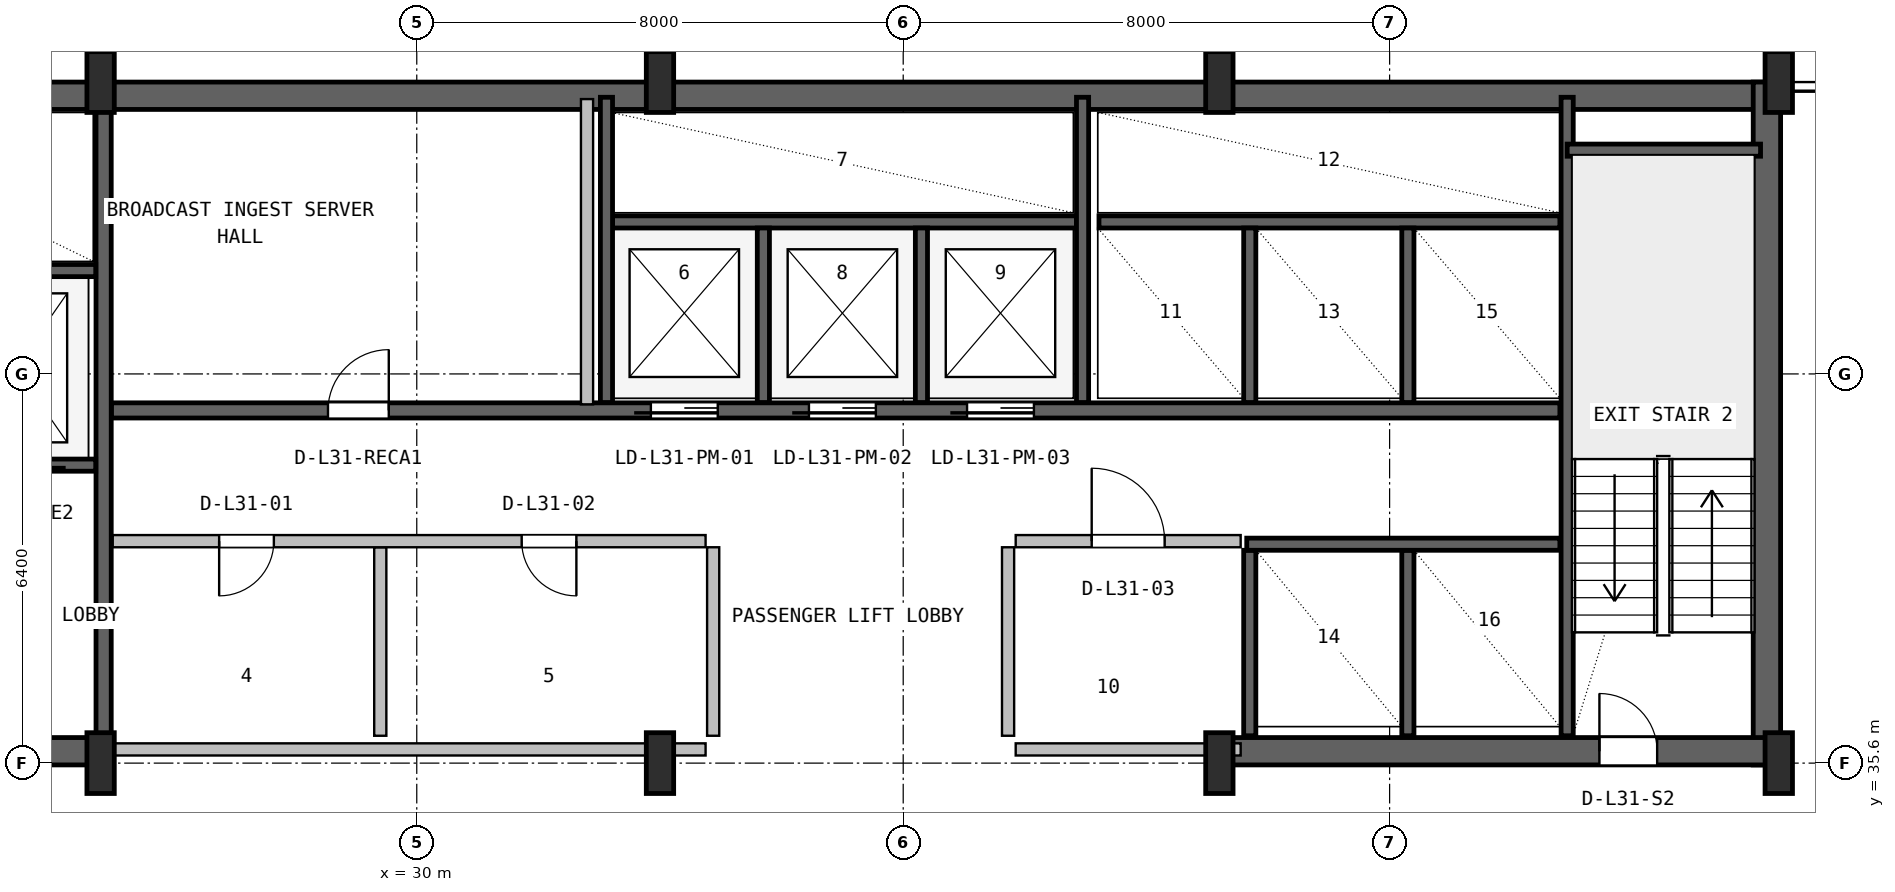
"""IFC4 building model, lengths in metres.
Left out: names, types, materials, properties, quantities, classifications, styles, units other than length and angle.
Written with IfcOpenShell. Run it as: python <this file> out.ifc"""

import sys

from ifc_helpers import new_model, si_unit, direction, frame, frame_2d, origin, origin_2d, place, context, subcontext, project, spatial, rectangle, i_section, extrude, source, transform, mapped, element, fill, save


model = new_model("IFC4")
c1 = context("Model", 3, precision=1e-05, world=origin(), true_north=direction((0.0, 1.0)))
c2 = subcontext(c1, "Body", "Model", "MODEL_VIEW")
j1 = project(units=[si_unit("LENGTHUNIT", "METRE"), si_unit("PLANEANGLEUNIT", "RADIAN")], contexts=[c1])
p1 = place(None, origin())
s1 = spatial("IfcSite", under=j1, at=p1, CompositionType="ELEMENT")
p2 = place(p1, origin())
s2 = spatial("IfcBuilding", under=s1, at=p2, CompositionType="ELEMENT")
p3 = place(p2, frame((0.0, 0.0, 129.6)))
s3 = spatial("IfcBuildingStorey", under=s2, at=p3, CompositionType="ELEMENT", Elevation=129.6)
p4 = place(p3, frame((15.6, 46.575, 0.0), z_axis=(0.0, 0.0, 1.0), x_axis=(1.0, 0.0, 0.0)))
e1 = element("IfcWall", 1, at=p4, inside=s3, PredefinedType="SHEAR", context=c2, shape_type="SweptSolid", body=[
    extrude(rectangle(XDim=36.8, YDim=0.45, at=frame_2d((18.4, 0.0))), origin(), (0.0, 0.0, 1.0), 3.55),
])
p5 = place(p3, frame((52.205, 35.57, 0.0), z_axis=(0.0, 0.0, 1.0), x_axis=(0.0, 1.0, 0.0)))
e2 = element("IfcWall", 2, at=p5, inside=s3, PredefinedType="SHEAR", context=c2, shape_type="SweptSolid", body=[
    extrude(rectangle(XDim=11.23, YDim=0.45, at=frame_2d((5.615, 0.0))), origin(), (0.0, 0.0, 1.0), 3.55),
])
p6 = place(p3, frame((15.57, 35.795, 0.0), z_axis=(0.0, 0.0, 1.0), x_axis=(1.0, 0.0, 0.0)))
e3 = element("IfcWall", 3, at=p6, inside=s3, PredefinedType="SHEAR", context=c2, shape_type="SweptSolid", body=[
    extrude(rectangle(XDim=9.23, YDim=0.45, at=frame_2d((4.615, 0.0))), origin(), (0.0, 0.0, 1.0), 3.55),
])
p7 = place(p6, frame((5.4, 0.0, 0.0)))
e4 = element("IfcOpeningElement", 4, at=p7, cuts=e3, PredefinedType="OPENING", context=c2, shape_type="SweptSolid", body=[
    extrude(rectangle(XDim=1.0, YDim=2.1, at=frame_2d((0.5, 1.05))), frame((0.0, 0.235, 0.0), z_axis=(0.0, -1.0, 0.0), x_axis=(1.0, 0.0, 0.0)), (0.0, 0.0, 1.0), 0.47),
])
p8 = place(p3, frame((43.2, 35.795, 0.0), z_axis=(0.0, 0.0, 1.0), x_axis=(1.0, 0.0, 0.0)))
e5 = element("IfcWall", 5, at=p8, inside=s3, PredefinedType="SHEAR", context=c2, shape_type="SweptSolid", body=[
    extrude(rectangle(XDim=9.23, YDim=0.45, at=frame_2d((4.615, 0.0))), origin(), (0.0, 0.0, 1.0), 3.55),
])
p9 = place(p8, frame((6.25, 0.0, 0.0)))
e6 = element("IfcOpeningElement", 6, at=p9, cuts=e5, PredefinedType="OPENING", context=c2, shape_type="SweptSolid", body=[
    extrude(rectangle(XDim=0.95, YDim=2.1, at=frame_2d((0.475, 1.05))), frame((0.0, 0.235, 0.0), z_axis=(0.0, -1.0, 0.0), x_axis=(1.0, 0.0, 0.0)), (0.0, 0.0, 1.0), 0.47),
])
m1 = source(origin(), c2, "Body", "SweptSolid", [
    extrude(i_section(OverallWidth=0.45, OverallDepth=1.0, WebThickness=0.016, FlangeThickness=0.03, FilletRadius=0.016, at=origin_2d()), origin(), (0.0, 0.0, 1.0), 3.8),
])
for number, where, z_axis, x_axis in (
    (7, (24.8, 35.6, 0.0), (0.0, 0.0, 1.0), (1.0, 0.0, 0.0)),
    (8, (24.8, 46.8, 0.0), (0.0, 0.0, 1.0), (1.0, 0.0, 0.0)),
    (9, (34.0, 35.6, 0.0), (0.0, 0.0, 1.0), (1.0, 0.0, 0.0)),
    (10, (34.0, 46.8, 0.0), (0.0, 0.0, 1.0), (1.0, 0.0, 0.0)),
    (11, (43.2, 35.6, 0.0), (0.0, 0.0, 1.0), (1.0, 0.0, 0.0)),
    (12, (43.2, 46.8, 0.0), (0.0, 0.0, 1.0), (1.0, 0.0, 0.0)),
    (13, (52.4, 35.6, 0.0), (0.0, 0.0, 1.0), (1.0, 0.0, 0.0)),
    (14, (52.4, 46.8, 0.0), (0.0, 0.0, 1.0), (1.0, 0.0, 0.0)),
):
    element("IfcColumn", number, at=place(p3, frame(where, z_axis=z_axis, x_axis=x_axis)), inside=s3, PredefinedType="COLUMN", context=c2, shape_type="MappedRepresentation", body=[
        mapped(m1, transform((0.0, 0.0, 0.0), x_axis=(1.0, 0.0, 0.0), y_axis=(0.0, 1.0, 0.0), z_axis=(0.0, 0.0, 1.0), scale=1.0)),
    ])
p10 = place(p3, frame((24.85, 36.05, 0.0), z_axis=(0.0, 0.0, 1.0), x_axis=(0.0, 1.0, 0.0)))
e15 = element("IfcWall", 15, at=p10, inside=s3, PredefinedType="SHEAR", context=c2, shape_type="SweptSolid", body=[
    extrude(rectangle(XDim=10.45, YDim=0.25, at=frame_2d((5.225, 0.0))), origin(), (0.0, 0.0, 1.0), 3.55),
])
p11 = place(p3, frame((19.2, 40.5, 0.0), z_axis=(0.0, 0.0, 1.0), x_axis=(1.0, 0.0, 0.0)))
e16 = element("IfcWall", 16, at=p11, inside=s3, PredefinedType="SHEAR", context=c2, shape_type="SweptSolid", body=[
    extrude(rectangle(XDim=5.52, YDim=0.2, at=frame_2d((2.76, 0.0))), origin(), (0.0, 0.0, 1.0), 3.55),
])
p12 = place(p11, frame((1.05, 0.0, 0.0)))
e17 = element("IfcOpeningElement", 17, at=p12, cuts=e16, PredefinedType="OPENING", context=c2, shape_type="SweptSolid", body=[
    extrude(rectangle(XDim=1.1, YDim=2.18, at=frame_2d((0.55, 1.09))), frame((0.0, 0.11, 0.0), z_axis=(0.0, -1.0, 0.0), x_axis=(1.0, 0.0, 0.0)), (0.0, 0.0, 1.0), 0.22),
])
p13 = place(p11, frame((3.65, 0.0, 0.0)))
e18 = element("IfcOpeningElement", 18, at=p13, cuts=e16, PredefinedType="OPENING", context=c2, shape_type="SweptSolid", body=[
    extrude(rectangle(XDim=1.1, YDim=2.18, at=frame_2d((0.55, 1.09))), frame((0.0, 0.11, 0.0), z_axis=(0.0, -1.0, 0.0), x_axis=(1.0, 0.0, 0.0)), (0.0, 0.0, 1.0), 0.22),
])
p14 = place(p3, frame((19.2, 43.7, 0.0), z_axis=(0.0, 0.0, 1.0), x_axis=(1.0, 0.0, 0.0)))
e19 = element("IfcWall", 19, at=p14, inside=s3, PredefinedType="SHEAR", context=c2, shape_type="SweptSolid", body=[
    extrude(rectangle(XDim=5.52, YDim=0.2, at=frame_2d((2.76, 0.0))), origin(), (0.0, 0.0, 1.0), 3.55),
])
p15 = place(p3, frame((48.92, 36.05, 0.0), z_axis=(0.0, 0.0, 1.0), x_axis=(0.0, 1.0, 0.0)))
e20 = element("IfcWall", 20, at=p15, inside=s3, PredefinedType="SHEAR", context=c2, shape_type="SweptSolid", body=[
    extrude(rectangle(XDim=10.5, YDim=0.2, at=frame_2d((5.25, 0.0))), origin(), (0.0, 0.0, 1.0), 3.55),
])
p16 = place(p3, frame((48.92, 45.68, 0.0), z_axis=(0.0, 0.0, 1.0), x_axis=(1.0, 0.0, 0.0)))
e21 = element("IfcWall", 21, at=p16, inside=s3, PredefinedType="SHEAR", context=c2, shape_type="SweptSolid", body=[
    extrude(rectangle(XDim=3.18, YDim=0.2, at=frame_2d((1.59, 0.0))), origin(), (0.0, 0.0, 1.0), 3.55),
])
p17 = place(p3, frame((24.98, 41.4, 0.0), z_axis=(0.0, 0.0, 1.0), x_axis=(1.0, 0.0, 0.0)))
e22 = element("IfcWall", 22, at=p17, inside=s3, PredefinedType="SHEAR", context=c2, shape_type="SweptSolid", body=[
    extrude(rectangle(XDim=23.82, YDim=0.25, at=frame_2d((11.91, 0.0))), origin(), (0.0, 0.0, 1.0), 3.55),
])
p18 = place(p17, frame((8.87, 0.0, 0.0)))
e23 = element("IfcOpeningElement", 23, at=p18, cuts=e22, PredefinedType="OPENING", context=c2, shape_type="SweptSolid", body=[
    extrude(rectangle(XDim=1.1, YDim=2.18, at=frame_2d((0.55, 1.09))), frame((0.0, 0.135, 0.0), z_axis=(0.0, -1.0, 0.0), x_axis=(1.0, 0.0, 0.0)), (0.0, 0.0, 1.0), 0.27),
])
p19 = place(p17, frame((11.47, 0.0, 0.0)))
e24 = element("IfcOpeningElement", 24, at=p19, cuts=e22, PredefinedType="OPENING", context=c2, shape_type="SweptSolid", body=[
    extrude(rectangle(XDim=1.1, YDim=2.18, at=frame_2d((0.55, 1.09))), frame((0.0, 0.135, 0.0), z_axis=(0.0, -1.0, 0.0), x_axis=(1.0, 0.0, 0.0)), (0.0, 0.0, 1.0), 0.27),
])
p20 = place(p17, frame((14.07, 0.0, 0.0)))
e25 = element("IfcOpeningElement", 25, at=p20, cuts=e22, PredefinedType="OPENING", context=c2, shape_type="SweptSolid", body=[
    extrude(rectangle(XDim=1.1, YDim=2.18, at=frame_2d((0.55, 1.09))), frame((0.0, 0.135, 0.0), z_axis=(0.0, -1.0, 0.0), x_axis=(1.0, 0.0, 0.0)), (0.0, 0.0, 1.0), 0.27),
])
p21 = place(p17, frame((3.56, 0.0, 0.0)))
e26 = element("IfcOpeningElement", 26, at=p21, cuts=e22, PredefinedType="OPENING", context=c2, shape_type="SweptSolid", body=[
    extrude(rectangle(XDim=1.0, YDim=2.08, at=frame_2d((0.5, 1.04))), frame((0.0, 0.135, 0.0), z_axis=(0.0, -1.0, 0.0), x_axis=(1.0, 0.0, 0.0)), (0.0, 0.0, 1.0), 0.27),
])
p22 = place(p3, frame((33.22, 44.5, 0.0), z_axis=(0.0, 0.0, 1.0), x_axis=(1.0, 0.0, 0.0)))
e27 = element("IfcWall", 27, at=p22, inside=s3, PredefinedType="SHEAR", context=c2, shape_type="SweptSolid", body=[
    extrude(rectangle(XDim=7.63, YDim=0.2, at=frame_2d((3.815, 0.0))), origin(), (0.0, 0.0, 1.0), 3.55),
])
p23 = place(p3, frame((33.12, 41.53, 0.0), z_axis=(0.0, 0.0, 1.0), x_axis=(0.0, 1.0, 0.0)))
e28 = element("IfcWall", 28, at=p23, inside=s3, PredefinedType="SHEAR", context=c2, shape_type="SweptSolid", body=[
    extrude(rectangle(XDim=5.02, YDim=0.2, at=frame_2d((2.51, 0.0))), origin(), (0.0, 0.0, 1.0), 3.55),
])
for number, where, z_axis, x_axis in (
    (29, (35.7, 41.53, 0.0), (0.0, 0.0, 1.0), (0.0, 1.0, 0.0)),
    (30, (38.3, 41.53, 0.0), (0.0, 0.0, 1.0), (0.0, 1.0, 0.0)),
):
    element("IfcWall", number, at=place(p3, frame(where, z_axis=z_axis, x_axis=x_axis)), inside=s3, PredefinedType="SHEAR", context=c2, shape_type="SweptSolid", body=[
        extrude(rectangle(XDim=2.87, YDim=0.2, at=frame_2d((1.435, 0.0))), origin(), (0.0, 0.0, 1.0), 3.55),
    ])
p24 = place(p3, frame((40.95, 41.53, 0.0), z_axis=(0.0, 0.0, 1.0), x_axis=(0.0, 1.0, 0.0)))
e31 = element("IfcWall", 31, at=p24, inside=s3, PredefinedType="SHEAR", context=c2, shape_type="SweptSolid", body=[
    extrude(rectangle(XDim=5.02, YDim=0.2, at=frame_2d((2.51, 0.0))), origin(), (0.0, 0.0, 1.0), 3.55),
])
p25 = place(p3, frame((41.22, 44.5, 0.0), z_axis=(0.0, 0.0, 1.0), x_axis=(1.0, 0.0, 0.0)))
e32 = element("IfcWall", 32, at=p25, inside=s3, PredefinedType="SHEAR", context=c2, shape_type="SweptSolid", body=[
    extrude(rectangle(XDim=7.58, YDim=0.2, at=frame_2d((3.79, 0.0))), origin(), (0.0, 0.0, 1.0), 3.55),
])
for number, where, z_axis, x_axis in (
    (33, (43.7, 41.53, 0.0), (0.0, 0.0, 1.0), (0.0, 1.0, 0.0)),
    (34, (46.3, 41.53, 0.0), (0.0, 0.0, 1.0), (0.0, 1.0, 0.0)),
):
    element("IfcWall", number, at=place(p3, frame(where, z_axis=z_axis, x_axis=x_axis)), inside=s3, PredefinedType="SHEAR", context=c2, shape_type="SweptSolid", body=[
        extrude(rectangle(XDim=2.87, YDim=0.2, at=frame_2d((1.435, 0.0))), origin(), (0.0, 0.0, 1.0), 3.55),
    ])
for number, where, z_axis, x_axis in (
    (35, (43.7, 36.05, 0.0), (0.0, 0.0, 1.0), (0.0, 1.0, 0.0)),
    (36, (46.3, 36.05, 0.0), (0.0, 0.0, 1.0), (0.0, 1.0, 0.0)),
):
    element("IfcWall", number, at=place(p3, frame(where, z_axis=z_axis, x_axis=x_axis)), inside=s3, PredefinedType="SHEAR", context=c2, shape_type="SweptSolid", body=[
        extrude(rectangle(XDim=3.05, YDim=0.2, at=frame_2d((1.525, 0.0))), origin(), (0.0, 0.0, 1.0), 3.55),
    ])
p26 = place(p3, frame((43.65, 39.2, 0.0), z_axis=(0.0, 0.0, 1.0), x_axis=(1.0, 0.0, 0.0)))
e37 = element("IfcWall", 37, at=p26, inside=s3, PredefinedType="SHEAR", context=c2, shape_type="SweptSolid", body=[
    extrude(rectangle(XDim=5.15, YDim=0.2, at=frame_2d((2.575, 0.0))), origin(), (0.0, 0.0, 1.0), 3.55),
])
p27 = place(p3, frame((25.0, 35.825, 0.0), z_axis=(0.0, 0.0, 1.0), x_axis=(1.0, 0.0, 0.0)))
e38 = element("IfcWall", 38, at=p27, inside=s3, PredefinedType="PLUMBINGWALL", context=c2, shape_type="SweptSolid", body=[
    extrude(rectangle(XDim=9.75, YDim=0.2, at=frame_2d((4.875, 0.0))), origin(), (0.0, 0.0, 1.0), 2.325),
])
p28 = place(p3, frame((29.4, 36.05, 0.0), z_axis=(0.0, 0.0, 1.0), x_axis=(0.0, 1.0, 0.0)))
e39 = element("IfcWall", 39, at=p28, inside=s3, PredefinedType="PLUMBINGWALL", context=c2, shape_type="SweptSolid", body=[
    extrude(rectangle(XDim=3.1, YDim=0.2, at=frame_2d((1.55, 0.0))), origin(), (0.0, 0.0, 1.0), 3.53),
])
p29 = place(p3, frame((25.0, 39.25, 0.0), z_axis=(0.0, 0.0, 1.0), x_axis=(1.0, 0.0, 0.0)))
e40 = element("IfcWall", 40, at=p29, inside=s3, PredefinedType="PLUMBINGWALL", context=c2, shape_type="SweptSolid", body=[
    extrude(rectangle(XDim=9.75, YDim=0.2, at=frame_2d((4.875, 0.0))), origin(), (0.0, 0.0, 1.0), 3.53),
])
p30 = place(p29, frame((1.75, 0.0, 0.0)))
e41 = element("IfcOpeningElement", 41, at=p30, cuts=e40, PredefinedType="OPENING", context=c2, shape_type="SweptSolid", body=[
    extrude(rectangle(XDim=0.9, YDim=2.06, at=frame_2d((0.45, 1.03))), frame((0.0, 0.11, 0.0), z_axis=(0.0, -1.0, 0.0), x_axis=(1.0, 0.0, 0.0)), (0.0, 0.0, 1.0), 0.22),
])
p31 = place(p29, frame((6.725, 0.0, 0.0)))
e42 = element("IfcOpeningElement", 42, at=p31, cuts=e40, PredefinedType="OPENING", context=c2, shape_type="SweptSolid", body=[
    extrude(rectangle(XDim=0.9, YDim=2.06, at=frame_2d((0.45, 1.03))), frame((0.0, 0.11, 0.0), z_axis=(0.0, -1.0, 0.0), x_axis=(1.0, 0.0, 0.0)), (0.0, 0.0, 1.0), 0.22),
])
p32 = place(p3, frame((34.875, 36.05, 0.0), z_axis=(0.0, 0.0, 1.0), x_axis=(0.0, 1.0, 0.0)))
e43 = element("IfcWall", 43, at=p32, inside=s3, PredefinedType="PLUMBINGWALL", context=c2, shape_type="SweptSolid", body=[
    extrude(rectangle(XDim=3.1, YDim=0.2, at=frame_2d((1.55, 0.0))), origin(), (0.0, 0.0, 1.0), 3.53),
])
p33 = place(p3, frame((39.85, 35.825, 0.0), z_axis=(0.0, 0.0, 1.0), x_axis=(1.0, 0.0, 0.0)))
e44 = element("IfcWall", 44, at=p33, inside=s3, PredefinedType="SOLIDWALL", context=c2, shape_type="SweptSolid", body=[
    extrude(rectangle(XDim=3.7, YDim=0.2, at=frame_2d((1.85, 0.0))), origin(), (0.0, 0.0, 1.0), 2.325),
])
p34 = place(p3, frame((39.85, 39.25, 0.0), z_axis=(0.0, 0.0, 1.0), x_axis=(1.0, 0.0, 0.0)))
e45 = element("IfcWall", 45, at=p34, inside=s3, PredefinedType="SOLIDWALL", context=c2, shape_type="SweptSolid", body=[
    extrude(rectangle(XDim=3.7, YDim=0.2, at=frame_2d((1.85, 0.0))), origin(), (0.0, 0.0, 1.0), 3.53),
])
p35 = place(p34, frame((1.25, 0.0, 0.0)))
e46 = element("IfcOpeningElement", 46, at=p35, cuts=e45, PredefinedType="OPENING", context=c2, shape_type="SweptSolid", body=[
    extrude(rectangle(XDim=1.2, YDim=2.1, at=frame_2d((0.6, 1.05))), frame((0.0, 0.11, 0.0), z_axis=(0.0, -1.0, 0.0), x_axis=(1.0, 0.0, 0.0)), (0.0, 0.0, 1.0), 0.22),
])
p36 = place(p3, frame((39.725, 36.05, 0.0), z_axis=(0.0, 0.0, 1.0), x_axis=(0.0, 1.0, 0.0)))
e47 = element("IfcWall", 47, at=p36, inside=s3, PredefinedType="SOLIDWALL", context=c2, shape_type="SweptSolid", body=[
    extrude(rectangle(XDim=3.1, YDim=0.2, at=frame_2d((1.55, 0.0))), origin(), (0.0, 0.0, 1.0), 3.53),
])
p37 = place(p3, frame((32.8, 41.5, 0.0), z_axis=(0.0, 0.0, 1.0), x_axis=(0.0, 1.0, 0.0)))
e48 = element("IfcWall", 48, at=p37, inside=s3, PredefinedType="SOLIDWALL", context=c2, shape_type="SweptSolid", body=[
    extrude(rectangle(XDim=5.02, YDim=0.2, at=frame_2d((2.51, 0.0))), origin(), (0.0, 0.0, 1.0), 3.53),
])
m2 = source(origin(), c2, "Body", "SweptSolid", [
    extrude(rectangle(XDim=0.95, YDim=2.1, at=frame_2d((0.475, 1.05))), frame((0.0, 0.025, 0.0), z_axis=(0.0, -1.0, 0.0), x_axis=(1.0, 0.0, 0.0)), (0.0, 0.0, 1.0), 0.05),
])
p38 = place(p9, origin())
e49 = element("IfcDoor", 49, at=p38, inside=s3, OperationType="SINGLE_SWING_LEFT", PredefinedType="DOOR", context=c2, shape_type="MappedRepresentation", body=[
    mapped(m2, transform((0.0, 0.0, 0.0), x_axis=(1.0, 0.0, 0.0), y_axis=(0.0, 1.0, 0.0), z_axis=(0.0, 0.0, 1.0), scale=1.0)),
])
fill(e6, e49)
m3 = source(origin(), c2, "Body", "SweptSolid", [
    extrude(rectangle(XDim=1.1, YDim=2.18, at=frame_2d((0.55, 1.09))), frame((0.0, 0.025, 0.0), z_axis=(0.0, -1.0, 0.0), x_axis=(1.0, 0.0, 0.0)), (0.0, 0.0, 1.0), 0.05),
])
p39 = place(p18, frame((1.1, 0.0, 0.0), z_axis=(0.0, 0.0, 1.0), x_axis=(-1.0, 0.0, 0.0)))
e50 = element("IfcDoor", 50, at=p39, inside=s3, OperationType="SLIDING_TO_LEFT", PredefinedType="DOOR", context=c2, shape_type="MappedRepresentation", body=[
    mapped(m3, transform((0.0, 0.0, 0.0), x_axis=(1.0, 0.0, 0.0), y_axis=(0.0, 1.0, 0.0), z_axis=(0.0, 0.0, 1.0), scale=1.0)),
])
fill(e23, e50)
p40 = place(p19, frame((1.1, 0.0, 0.0), z_axis=(0.0, 0.0, 1.0), x_axis=(-1.0, 0.0, 0.0)))
e51 = element("IfcDoor", 51, at=p40, inside=s3, OperationType="SLIDING_TO_LEFT", PredefinedType="DOOR", context=c2, shape_type="MappedRepresentation", body=[
    mapped(m3, transform((0.0, 0.0, 0.0), x_axis=(1.0, 0.0, 0.0), y_axis=(0.0, 1.0, 0.0), z_axis=(0.0, 0.0, 1.0), scale=1.0)),
])
fill(e24, e51)
p41 = place(p20, frame((1.1, 0.0, 0.0), z_axis=(0.0, 0.0, 1.0), x_axis=(-1.0, 0.0, 0.0)))
e52 = element("IfcDoor", 52, at=p41, inside=s3, OperationType="SLIDING_TO_LEFT", PredefinedType="DOOR", context=c2, shape_type="MappedRepresentation", body=[
    mapped(m3, transform((0.0, 0.0, 0.0), x_axis=(1.0, 0.0, 0.0), y_axis=(0.0, 1.0, 0.0), z_axis=(0.0, 0.0, 1.0), scale=1.0)),
])
fill(e25, e52)
m4 = source(origin(), c2, "Body", "SweptSolid", [
    extrude(rectangle(XDim=1.0, YDim=2.08, at=frame_2d((0.5, 1.04))), frame((0.0, 0.025, 0.0), z_axis=(0.0, -1.0, 0.0), x_axis=(1.0, 0.0, 0.0)), (0.0, 0.0, 1.0), 0.05),
])
p42 = place(p21, origin())
e53 = element("IfcDoor", 53, at=p42, inside=s3, OperationType="SINGLE_SWING_RIGHT", PredefinedType="DOOR", context=c2, shape_type="MappedRepresentation", body=[
    mapped(m4, transform((0.0, 0.0, 0.0), x_axis=(1.0, 0.0, 0.0), y_axis=(0.0, 1.0, 0.0), z_axis=(0.0, 0.0, 1.0), scale=1.0)),
])
fill(e26, e53)
m5 = source(origin(), c2, "Body", "SweptSolid", [
    extrude(rectangle(XDim=0.9, YDim=2.06, at=frame_2d((0.45, 1.03))), frame((0.0, 0.025, 0.0), z_axis=(0.0, -1.0, 0.0), x_axis=(1.0, 0.0, 0.0)), (0.0, 0.0, 1.0), 0.05),
])
p43 = place(p30, frame((0.9, 0.0, 0.0), z_axis=(0.0, 0.0, 1.0), x_axis=(-1.0, 0.0, 0.0)))
e54 = element("IfcDoor", 54, at=p43, inside=s3, OperationType="SINGLE_SWING_LEFT", PredefinedType="DOOR", context=c2, shape_type="MappedRepresentation", body=[
    mapped(m5, transform((0.0, 0.0, 0.0), x_axis=(1.0, 0.0, 0.0), y_axis=(0.0, 1.0, 0.0), z_axis=(0.0, 0.0, 1.0), scale=1.0)),
])
fill(e41, e54)
p44 = place(p31, frame((0.9, 0.0, 0.0), z_axis=(0.0, 0.0, 1.0), x_axis=(-1.0, 0.0, 0.0)))
e55 = element("IfcDoor", 55, at=p44, inside=s3, OperationType="SINGLE_SWING_RIGHT", PredefinedType="DOOR", context=c2, shape_type="MappedRepresentation", body=[
    mapped(m5, transform((0.0, 0.0, 0.0), x_axis=(1.0, 0.0, 0.0), y_axis=(0.0, 1.0, 0.0), z_axis=(0.0, 0.0, 1.0), scale=1.0)),
])
fill(e42, e55)
m6 = source(origin(), c2, "Body", "SweptSolid", [
    extrude(rectangle(XDim=1.2, YDim=2.1, at=frame_2d((0.6, 1.05))), frame((0.0, 0.025, 0.0), z_axis=(0.0, -1.0, 0.0), x_axis=(1.0, 0.0, 0.0)), (0.0, 0.0, 1.0), 0.05),
])
p45 = place(p35, origin())
e56 = element("IfcDoor", 56, at=p45, inside=s3, OperationType="SINGLE_SWING_LEFT", PredefinedType="DOOR", context=c2, shape_type="MappedRepresentation", body=[
    mapped(m6, transform((0.0, 0.0, 0.0), x_axis=(1.0, 0.0, 0.0), y_axis=(0.0, 1.0, 0.0), z_axis=(0.0, 0.0, 1.0), scale=1.0)),
])
fill(e46, e56)
save(model, sys.argv[1])
